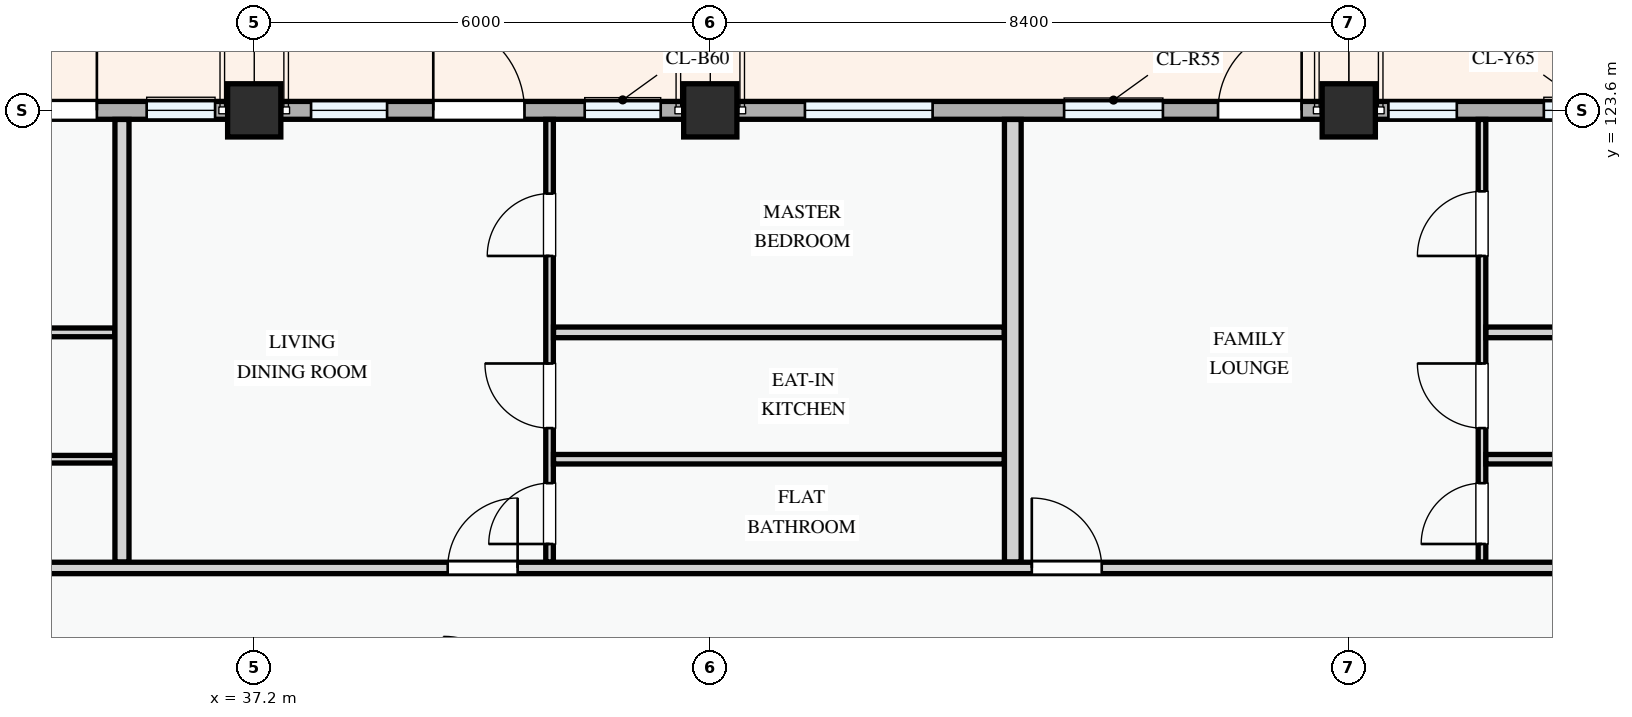
"""IFC4 building model, lengths in metres.
Left out: names, types, materials, properties, quantities, classifications, styles, units other than length and angle.
Written with IfcOpenShell. Run it as: python <this file> out.ifc"""

import sys

from ifc_helpers import new_model, si_unit, direction, frame, frame_2d, origin, origin_2d, place, context, subcontext, project, spatial, rectangle, extrude, element, fill, save


model = new_model("IFC4")
c1 = context("Model", 3, precision=1e-05, world=origin(), true_north=direction((0.0, 1.0)))
c2 = subcontext(c1, "Body", "Model", "MODEL_VIEW")
j1 = project(units=[si_unit("LENGTHUNIT", "METRE"), si_unit("PLANEANGLEUNIT", "RADIAN")], contexts=[c1])
p1 = place(None, origin())
s1 = spatial("IfcSite", under=j1, at=p1, CompositionType="ELEMENT")
p2 = place(p1, origin())
s2 = spatial("IfcBuilding", under=s1, at=p2, CompositionType="ELEMENT")
p3 = place(p2, frame((0.0, 0.0, 11.4)))
s3 = spatial("IfcBuildingStorey", under=s2, at=p3, CompositionType="ELEMENT", Elevation=11.4)
for number, where, z_axis, x_axis in (
    (1, (37.2, 123.6, 0.0), (0.0, 0.0, 1.0), (1.0, 0.0, 0.0)),
    (2, (43.2, 123.6, 0.0), (0.0, 0.0, 1.0), (1.0, 0.0, 0.0)),
    (3, (51.6, 123.6, 0.0), (0.0, 0.0, 1.0), (1.0, 0.0, 0.0)),
):
    element("IfcColumn", number, at=place(p3, frame(where, z_axis=z_axis, x_axis=x_axis)), inside=s3, PredefinedType="COLUMN", context=c2, shape_type="SweptSolid", body=[
        extrude(rectangle(XDim=0.7, YDim=0.7, at=origin_2d()), origin(), (0.0, 0.0, 1.0), 3.3),
    ])
p4 = place(p3, frame((57.6, 123.6, 0.0), z_axis=(0.0, 0.0, 1.0), x_axis=(-1.0, 0.0, 0.0)))
e4 = element("IfcWall", 4, at=p4, inside=s3, PredefinedType="STANDARD", context=c2, shape_type="SweptSolid", body=[
    extrude(rectangle(XDim=6.0, YDim=0.235, at=frame_2d((3.0, 0.0))), origin(), (0.0, 0.0, 1.0), 2.475),
])
p5 = place(p4, frame((0.62, 0.0, 0.0)))
e5 = element("IfcOpeningElement", 5, at=p5, cuts=e4, PredefinedType="OPENING", context=c2, shape_type="SweptSolid", body=[
    extrude(rectangle(XDim=1.05, YDim=2.15, at=frame_2d((0.525, 1.075))), frame((0.0, 0.127, 0.0), z_axis=(0.0, -1.0, 0.0), x_axis=(1.0, 0.0, 0.0)), (0.0, 0.0, 1.0), 0.255),
])
p6 = place(p4, frame((2.534, 0.0, 0.78)))
e6 = element("IfcOpeningElement", 6, at=p6, cuts=e4, PredefinedType="OPENING", context=c2, shape_type="SweptSolid", body=[
    extrude(rectangle(XDim=0.9, YDim=1.2, at=frame_2d((0.45, 0.6))), frame((0.0, 0.127, 0.0), z_axis=(0.0, -1.0, 0.0), x_axis=(1.0, 0.0, 0.0)), (0.0, 0.0, 1.0), 0.255),
])
p7 = place(p4, frame((4.579, 0.0, 0.78)))
e7 = element("IfcOpeningElement", 7, at=p7, cuts=e4, PredefinedType="OPENING", context=c2, shape_type="SweptSolid", body=[
    extrude(rectangle(XDim=0.9, YDim=1.2, at=frame_2d((0.45, 0.6))), frame((0.0, 0.127, 0.0), z_axis=(0.0, -1.0, 0.0), x_axis=(1.0, 0.0, 0.0)), (0.0, 0.0, 1.0), 0.255),
])
p8 = place(p3, frame((51.6, 123.6, 0.0), z_axis=(0.0, 0.0, 1.0), x_axis=(-1.0, 0.0, 0.0)))
e8 = element("IfcWall", 8, at=p8, inside=s3, PredefinedType="STANDARD", context=c2, shape_type="SweptSolid", body=[
    extrude(rectangle(XDim=8.4, YDim=0.235, at=frame_2d((4.2, 0.0))), origin(), (0.0, 0.0, 1.0), 2.375),
])
p9 = place(p8, frame((0.62, 0.0, 0.0)))
e9 = element("IfcOpeningElement", 9, at=p9, cuts=e8, PredefinedType="OPENING", context=c2, shape_type="SweptSolid", body=[
    extrude(rectangle(XDim=1.1, YDim=2.15, at=frame_2d((0.55, 1.075))), frame((0.0, 0.127, 0.0), z_axis=(0.0, -1.0, 0.0), x_axis=(1.0, 0.0, 0.0)), (0.0, 0.0, 1.0), 0.255),
])
p10 = place(p8, frame((2.445, 0.0, 0.78)))
e10 = element("IfcOpeningElement", 10, at=p10, cuts=e8, PredefinedType="OPENING", context=c2, shape_type="SweptSolid", body=[
    extrude(rectangle(XDim=1.3, YDim=1.4, at=frame_2d((0.65, 0.7))), frame((0.0, 0.127, 0.0), z_axis=(0.0, -1.0, 0.0), x_axis=(1.0, 0.0, 0.0)), (0.0, 0.0, 1.0), 0.255),
])
p11 = place(p8, frame((5.475, 0.0, 0.78)))
e11 = element("IfcOpeningElement", 11, at=p11, cuts=e8, PredefinedType="OPENING", context=c2, shape_type="SweptSolid", body=[
    extrude(rectangle(XDim=1.68, YDim=1.46, at=frame_2d((0.84, 0.73))), frame((0.0, 0.127, 0.0), z_axis=(0.0, -1.0, 0.0), x_axis=(1.0, 0.0, 0.0)), (0.0, 0.0, 1.0), 0.255),
])
p12 = place(p3, frame((43.2, 123.6, 0.0), z_axis=(0.0, 0.0, 1.0), x_axis=(-1.0, 0.0, 0.0)))
e12 = element("IfcWall", 12, at=p12, inside=s3, PredefinedType="STANDARD", context=c2, shape_type="SweptSolid", body=[
    extrude(rectangle(XDim=6.0, YDim=0.235, at=frame_2d((3.0, 0.0))), origin(), (0.0, 0.0, 1.0), 2.475),
])
p13 = place(p12, frame((2.444, 0.0, 0.0)))
e13 = element("IfcOpeningElement", 13, at=p13, cuts=e12, PredefinedType="OPENING", context=c2, shape_type="SweptSolid", body=[
    extrude(rectangle(XDim=1.2, YDim=2.15, at=frame_2d((0.6, 1.075))), frame((0.0, 0.127, 0.0), z_axis=(0.0, -1.0, 0.0), x_axis=(1.0, 0.0, 0.0)), (0.0, 0.0, 1.0), 0.255),
])
p14 = place(p12, frame((0.652, 0.0, 0.78)))
e14 = element("IfcOpeningElement", 14, at=p14, cuts=e12, PredefinedType="OPENING", context=c2, shape_type="SweptSolid", body=[
    extrude(rectangle(XDim=1.0, YDim=1.25, at=frame_2d((0.5, 0.625))), frame((0.0, 0.127, 0.0), z_axis=(0.0, -1.0, 0.0), x_axis=(1.0, 0.0, 0.0)), (0.0, 0.0, 1.0), 0.255),
])
p15 = place(p12, frame((4.252, 0.0, 0.78)))
e15 = element("IfcOpeningElement", 15, at=p15, cuts=e12, PredefinedType="OPENING", context=c2, shape_type="SweptSolid", body=[
    extrude(rectangle(XDim=1.0, YDim=1.25, at=frame_2d((0.5, 0.625))), frame((0.0, 0.127, 0.0), z_axis=(0.0, -1.0, 0.0), x_axis=(1.0, 0.0, 0.0)), (0.0, 0.0, 1.0), 0.255),
])
p16 = place(p3, frame((37.2, 123.6, 0.0), z_axis=(0.0, 0.0, 1.0), x_axis=(-1.0, 0.0, 0.0)))
e16 = element("IfcWall", 16, at=p16, inside=s3, PredefinedType="STANDARD", context=c2, shape_type="SweptSolid", body=[
    extrude(rectangle(XDim=8.4, YDim=0.235, at=frame_2d((4.2, 0.0))), origin(), (0.0, 0.0, 1.0), 2.375),
])
p17 = place(p16, frame((2.07, 0.0, 0.0)))
e17 = element("IfcOpeningElement", 17, at=p17, cuts=e16, PredefinedType="OPENING", context=c2, shape_type="SweptSolid", body=[
    extrude(rectangle(XDim=1.25, YDim=2.2, at=frame_2d((0.625, 1.1))), frame((0.0, 0.127, 0.0), z_axis=(0.0, -1.0, 0.0), x_axis=(1.0, 0.0, 0.0)), (0.0, 0.0, 1.0), 0.255),
])
p18 = place(p16, frame((0.515, 0.0, 0.78)))
e18 = element("IfcOpeningElement", 18, at=p18, cuts=e16, PredefinedType="OPENING", context=c2, shape_type="SweptSolid", body=[
    extrude(rectangle(XDim=0.9, YDim=1.2, at=frame_2d((0.45, 0.6))), frame((0.0, 0.127, 0.0), z_axis=(0.0, -1.0, 0.0), x_axis=(1.0, 0.0, 0.0)), (0.0, 0.0, 1.0), 0.255),
])
p19 = place(p16, frame((4.361, 0.0, 0.78)))
e19 = element("IfcOpeningElement", 19, at=p19, cuts=e16, PredefinedType="OPENING", context=c2, shape_type="SweptSolid", body=[
    extrude(rectangle(XDim=1.25, YDim=1.45, at=frame_2d((0.625, 0.725))), frame((0.0, 0.127, 0.0), z_axis=(0.0, -1.0, 0.0), x_axis=(1.0, 0.0, 0.0)), (0.0, 0.0, 1.0), 0.255),
])
p20 = place(p16, frame((6.931, 0.0, 0.78)))
e20 = element("IfcOpeningElement", 20, at=p20, cuts=e16, PredefinedType="OPENING", context=c2, shape_type="SweptSolid", body=[
    extrude(rectangle(XDim=0.95, YDim=1.15, at=frame_2d((0.475, 0.575))), frame((0.0, 0.127, 0.0), z_axis=(0.0, -1.0, 0.0), x_axis=(1.0, 0.0, 0.0)), (0.0, 0.0, 1.0), 0.255),
])
p21 = place(p3, frame((30.663, 120.679, 0.0), z_axis=(0.0, 0.0, 1.0), x_axis=(1.0, 0.0, 0.0)))
e21 = element("IfcWall", 21, at=p21, inside=s3, PredefinedType="PARTITIONING", context=c2, shape_type="SweptSolid", body=[
    extrude(rectangle(XDim=4.702, YDim=0.115, at=frame_2d((2.351, 0.0))), origin(), (0.0, 0.0, 1.0), 3.0),
])
p22 = place(p3, frame((30.663, 119.01, 0.0), z_axis=(0.0, 0.0, 1.0), x_axis=(1.0, 0.0, 0.0)))
e22 = element("IfcWall", 22, at=p22, inside=s3, PredefinedType="PARTITIONING", context=c2, shape_type="SweptSolid", body=[
    extrude(rectangle(XDim=4.702, YDim=0.1, at=frame_2d((2.351, 0.0))), origin(), (0.0, 0.0, 1.0), 3.0),
])
p23 = place(p3, frame((41.086, 117.657, 0.0), z_axis=(0.0, 0.0, 1.0), x_axis=(0.0, 1.0, 0.0)))
e23 = element("IfcWall", 23, at=p23, inside=s3, PredefinedType="PARTITIONING", context=c2, shape_type="SweptSolid", body=[
    extrude(rectangle(XDim=5.823, YDim=0.1, at=frame_2d((2.912, 0.0))), origin(), (0.0, 0.0, 1.0), 3.0),
])
p24 = place(p23, frame((0.238, 0.0, 0.0)))
e24 = element("IfcOpeningElement", 24, at=p24, cuts=e23, PredefinedType="OPENING", context=c2, shape_type="SweptSolid", body=[
    extrude(rectangle(XDim=0.8, YDim=2.1, at=frame_2d((0.4, 1.05))), frame((0.0, 0.06, 0.0), z_axis=(0.0, -1.0, 0.0), x_axis=(1.0, 0.0, 0.0)), (0.0, 0.0, 1.0), 0.12),
])
p25 = place(p23, frame((1.763, 0.0, 0.0)))
e25 = element("IfcOpeningElement", 25, at=p25, cuts=e23, PredefinedType="OPENING", context=c2, shape_type="SweptSolid", body=[
    extrude(rectangle(XDim=0.85, YDim=2.1, at=frame_2d((0.425, 1.05))), frame((0.0, 0.06, 0.0), z_axis=(0.0, -1.0, 0.0), x_axis=(1.0, 0.0, 0.0)), (0.0, 0.0, 1.0), 0.12),
])
p26 = place(p23, frame((4.028, 0.0, 0.0)))
e26 = element("IfcOpeningElement", 26, at=p26, cuts=e23, PredefinedType="OPENING", context=c2, shape_type="SweptSolid", body=[
    extrude(rectangle(XDim=0.82, YDim=2.08, at=frame_2d((0.41, 1.04))), frame((0.0, 0.06, 0.0), z_axis=(0.0, -1.0, 0.0), x_axis=(1.0, 0.0, 0.0)), (0.0, 0.0, 1.0), 0.12),
])
p27 = place(p3, frame((41.138, 120.679, 0.0), z_axis=(0.0, 0.0, 1.0), x_axis=(1.0, 0.0, 0.0)))
e27 = element("IfcWall", 27, at=p27, inside=s3, PredefinedType="PARTITIONING", context=c2, shape_type="SweptSolid", body=[
    extrude(rectangle(XDim=5.93, YDim=0.14, at=frame_2d((2.965, 0.0))), origin(), (0.0, 0.0, 1.0), 3.0),
])
p28 = place(p3, frame((41.138, 119.01, 0.0), z_axis=(0.0, 0.0, 1.0), x_axis=(1.0, 0.0, 0.0)))
e28 = element("IfcWall", 28, at=p28, inside=s3, PredefinedType="PARTITIONING", context=c2, shape_type="SweptSolid", body=[
    extrude(rectangle(XDim=5.93, YDim=0.125, at=frame_2d((2.965, 0.0))), origin(), (0.0, 0.0, 1.0), 3.0),
])
p29 = place(p3, frame((35.46, 117.657, 0.0), z_axis=(0.0, 0.0, 1.0), x_axis=(0.0, 1.0, 0.0)))
e29 = element("IfcWall", 29, at=p29, inside=s3, PredefinedType="PARTITIONING", context=c2, shape_type="SweptSolid", body=[
    extrude(rectangle(XDim=5.823, YDim=0.185, at=frame_2d((2.912, 0.0))), origin(), (0.0, 0.0, 1.0), 3.0),
])
p30 = place(p3, frame((53.353, 117.657, 0.0), z_axis=(0.0, 0.0, 1.0), x_axis=(0.0, 1.0, 0.0)))
e30 = element("IfcWall", 30, at=p30, inside=s3, PredefinedType="PARTITIONING", context=c2, shape_type="SweptSolid", body=[
    extrude(rectangle(XDim=5.823, YDim=0.1, at=frame_2d((2.912, 0.0))), origin(), (0.0, 0.0, 1.0), 3.0),
])
p31 = place(p30, frame((0.238, 0.0, 0.0)))
e31 = element("IfcOpeningElement", 31, at=p31, cuts=e30, PredefinedType="OPENING", context=c2, shape_type="SweptSolid", body=[
    extrude(rectangle(XDim=0.8, YDim=2.1, at=frame_2d((0.4, 1.05))), frame((0.0, 0.06, 0.0), z_axis=(0.0, -1.0, 0.0), x_axis=(1.0, 0.0, 0.0)), (0.0, 0.0, 1.0), 0.12),
])
p32 = place(p30, frame((1.763, 0.0, 0.0)))
e32 = element("IfcOpeningElement", 32, at=p32, cuts=e30, PredefinedType="OPENING", context=c2, shape_type="SweptSolid", body=[
    extrude(rectangle(XDim=0.85, YDim=2.1, at=frame_2d((0.425, 1.05))), frame((0.0, 0.06, 0.0), z_axis=(0.0, -1.0, 0.0), x_axis=(1.0, 0.0, 0.0)), (0.0, 0.0, 1.0), 0.12),
])
p33 = place(p30, frame((4.028, 0.0, 0.0)))
e33 = element("IfcOpeningElement", 33, at=p33, cuts=e30, PredefinedType="OPENING", context=c2, shape_type="SweptSolid", body=[
    extrude(rectangle(XDim=0.85, YDim=2.1, at=frame_2d((0.425, 1.05))), frame((0.0, 0.06, 0.0), z_axis=(0.0, -1.0, 0.0), x_axis=(1.0, 0.0, 0.0)), (0.0, 0.0, 1.0), 0.12),
])
p34 = place(p3, frame((53.405, 120.679, 0.0), z_axis=(0.0, 0.0, 1.0), x_axis=(1.0, 0.0, 0.0)))
e34 = element("IfcWall", 34, at=p34, inside=s3, PredefinedType="PARTITIONING", context=c2, shape_type="SweptSolid", body=[
    extrude(rectangle(XDim=4.135, YDim=0.14, at=frame_2d((2.068, 0.0))), origin(), (0.0, 0.0, 1.0), 3.0),
])
p35 = place(p3, frame((53.405, 119.01, 0.0), z_axis=(0.0, 0.0, 1.0), x_axis=(1.0, 0.0, 0.0)))
e35 = element("IfcWall", 35, at=p35, inside=s3, PredefinedType="PARTITIONING", context=c2, shape_type="SweptSolid", body=[
    extrude(rectangle(XDim=4.135, YDim=0.125, at=frame_2d((2.068, 0.0))), origin(), (0.0, 0.0, 1.0), 3.0),
])
p36 = place(p3, frame((47.18, 117.657, 0.0), z_axis=(0.0, 0.0, 1.0), x_axis=(0.0, 1.0, 0.0)))
e36 = element("IfcWall", 36, at=p36, inside=s3, PredefinedType="PARTITIONING", context=c2, shape_type="SweptSolid", body=[
    extrude(rectangle(XDim=5.823, YDim=0.22, at=frame_2d((2.912, 0.0))), origin(), (0.0, 0.0, 1.0), 2.585),
])
p37 = place(p3, frame((22.66, 117.58, 0.0), z_axis=(0.0, 0.0, 1.0), x_axis=(1.0, 0.0, 0.0)))
e37 = element("IfcWall", 37, at=p37, inside=s3, PredefinedType="PARTITIONING", context=c2, shape_type="SweptSolid", body=[
    extrude(rectangle(XDim=34.88, YDim=0.15, at=frame_2d((17.44, 0.0))), origin(), (0.0, 0.0, 1.0), 3.0),
])
p38 = place(p37, frame((2.74, 0.0, 0.0)))
e38 = element("IfcOpeningElement", 38, at=p38, cuts=e37, PredefinedType="OPENING", context=c2, shape_type="SweptSolid", body=[
    extrude(rectangle(XDim=0.92, YDim=2.1, at=frame_2d((0.46, 1.05))), frame((0.0, 0.085, 0.0), z_axis=(0.0, -1.0, 0.0), x_axis=(1.0, 0.0, 0.0)), (0.0, 0.0, 1.0), 0.17),
])
p39 = place(p37, frame((17.085, 0.0, 0.0)))
e39 = element("IfcOpeningElement", 39, at=p39, cuts=e37, PredefinedType="OPENING", context=c2, shape_type="SweptSolid", body=[
    extrude(rectangle(XDim=0.92, YDim=2.1, at=frame_2d((0.46, 1.05))), frame((0.0, 0.085, 0.0), z_axis=(0.0, -1.0, 0.0), x_axis=(1.0, 0.0, 0.0)), (0.0, 0.0, 1.0), 0.17),
])
p40 = place(p37, frame((24.77, 0.0, 0.0)))
e40 = element("IfcOpeningElement", 40, at=p40, cuts=e37, PredefinedType="OPENING", context=c2, shape_type="SweptSolid", body=[
    extrude(rectangle(XDim=0.92, YDim=2.1, at=frame_2d((0.46, 1.05))), frame((0.0, 0.085, 0.0), z_axis=(0.0, -1.0, 0.0), x_axis=(1.0, 0.0, 0.0)), (0.0, 0.0, 1.0), 0.17),
])
p41 = place(p6, origin())
e41 = element("IfcWindow", 41, at=p41, inside=s3, PartitioningType="SINGLE_PANEL", PredefinedType="WINDOW", context=c2, shape_type="SweptSolid", body=[
    extrude(rectangle(XDim=0.9, YDim=1.2, at=frame_2d((0.45, 0.6))), frame((0.0, 0.03, 0.0), z_axis=(0.0, -1.0, 0.0), x_axis=(1.0, 0.0, 0.0)), (0.0, 0.0, 1.0), 0.06),
])
fill(e6, e41)
p42 = place(p7, origin())
e42 = element("IfcWindow", 42, at=p42, inside=s3, PartitioningType="SINGLE_PANEL", PredefinedType="WINDOW", context=c2, shape_type="SweptSolid", body=[
    extrude(rectangle(XDim=0.9, YDim=1.2, at=frame_2d((0.45, 0.6))), frame((0.0, 0.03, 0.0), z_axis=(0.0, -1.0, 0.0), x_axis=(1.0, 0.0, 0.0)), (0.0, 0.0, 1.0), 0.06),
])
fill(e7, e42)
p43 = place(p9, frame((1.1, 0.0, 0.0), z_axis=(0.0, 0.0, 1.0), x_axis=(-1.0, 0.0, 0.0)))
e43 = element("IfcDoor", 43, at=p43, inside=s3, OperationType="SINGLE_SWING_RIGHT", PredefinedType="DOOR", context=c2, shape_type="SweptSolid", body=[
    extrude(rectangle(XDim=1.1, YDim=2.15, at=frame_2d((0.55, 1.075))), frame((0.0, 0.025, 0.0), z_axis=(0.0, -1.0, 0.0), x_axis=(1.0, 0.0, 0.0)), (0.0, 0.0, 1.0), 0.05),
])
fill(e9, e43)
p44 = place(p10, origin())
e44 = element("IfcWindow", 44, at=p44, inside=s3, PartitioningType="SINGLE_PANEL", PredefinedType="WINDOW", context=c2, shape_type="SweptSolid", body=[
    extrude(rectangle(XDim=1.3, YDim=1.4, at=frame_2d((0.65, 0.7))), frame((0.0, 0.03, 0.0), z_axis=(0.0, -1.0, 0.0), x_axis=(1.0, 0.0, 0.0)), (0.0, 0.0, 1.0), 0.06),
])
fill(e10, e44)
p45 = place(p11, origin())
e45 = element("IfcWindow", 45, at=p45, inside=s3, PartitioningType="DOUBLE_PANEL_VERTICAL", PredefinedType="WINDOW", context=c2, shape_type="SweptSolid", body=[
    extrude(rectangle(XDim=1.68, YDim=1.46, at=frame_2d((0.84, 0.73))), frame((0.0, 0.03, 0.0), z_axis=(0.0, -1.0, 0.0), x_axis=(1.0, 0.0, 0.0)), (0.0, 0.0, 1.0), 0.06),
])
fill(e11, e45)
p46 = place(p13, frame((1.2, 0.0, 0.0), z_axis=(0.0, 0.0, 1.0), x_axis=(-1.0, 0.0, 0.0)))
e46 = element("IfcDoor", 46, at=p46, inside=s3, OperationType="SINGLE_SWING_LEFT", PredefinedType="DOOR", context=c2, shape_type="SweptSolid", body=[
    extrude(rectangle(XDim=1.2, YDim=2.15, at=frame_2d((0.6, 1.075))), frame((0.0, 0.025, 0.0), z_axis=(0.0, -1.0, 0.0), x_axis=(1.0, 0.0, 0.0)), (0.0, 0.0, 1.0), 0.05),
])
fill(e13, e46)
p47 = place(p14, origin())
e47 = element("IfcWindow", 47, at=p47, inside=s3, PartitioningType="SINGLE_PANEL", PredefinedType="WINDOW", context=c2, shape_type="SweptSolid", body=[
    extrude(rectangle(XDim=1.0, YDim=1.25, at=frame_2d((0.5, 0.625))), frame((0.0, 0.03, 0.0), z_axis=(0.0, -1.0, 0.0), x_axis=(1.0, 0.0, 0.0)), (0.0, 0.0, 1.0), 0.06),
])
fill(e14, e47)
p48 = place(p15, origin())
e48 = element("IfcWindow", 48, at=p48, inside=s3, PartitioningType="SINGLE_PANEL", PredefinedType="WINDOW", context=c2, shape_type="SweptSolid", body=[
    extrude(rectangle(XDim=1.0, YDim=1.25, at=frame_2d((0.5, 0.625))), frame((0.0, 0.03, 0.0), z_axis=(0.0, -1.0, 0.0), x_axis=(1.0, 0.0, 0.0)), (0.0, 0.0, 1.0), 0.06),
])
fill(e15, e48)
p49 = place(p17, frame((1.25, 0.0, 0.0), z_axis=(0.0, 0.0, 1.0), x_axis=(-1.0, 0.0, 0.0)))
e49 = element("IfcDoor", 49, at=p49, inside=s3, OperationType="SINGLE_SWING_RIGHT", PredefinedType="DOOR", context=c2, shape_type="SweptSolid", body=[
    extrude(rectangle(XDim=1.25, YDim=2.2, at=frame_2d((0.625, 1.1))), frame((0.0, 0.025, 0.0), z_axis=(0.0, -1.0, 0.0), x_axis=(1.0, 0.0, 0.0)), (0.0, 0.0, 1.0), 0.05),
])
fill(e17, e49)
p50 = place(p18, origin())
e50 = element("IfcWindow", 50, at=p50, inside=s3, PartitioningType="SINGLE_PANEL", PredefinedType="WINDOW", context=c2, shape_type="SweptSolid", body=[
    extrude(rectangle(XDim=0.9, YDim=1.2, at=frame_2d((0.45, 0.6))), frame((0.0, 0.03, 0.0), z_axis=(0.0, -1.0, 0.0), x_axis=(1.0, 0.0, 0.0)), (0.0, 0.0, 1.0), 0.06),
])
fill(e18, e50)
p51 = place(p24, origin())
e51 = element("IfcDoor", 51, at=p51, inside=s3, OperationType="SINGLE_SWING_LEFT", PredefinedType="DOOR", context=c2, shape_type="SweptSolid", body=[
    extrude(rectangle(XDim=0.8, YDim=2.1, at=frame_2d((0.4, 1.05))), frame((0.0, 0.025, 0.0), z_axis=(0.0, -1.0, 0.0), x_axis=(1.0, 0.0, 0.0)), (0.0, 0.0, 1.0), 0.05),
])
fill(e24, e51)
p52 = place(p25, origin())
e52 = element("IfcDoor", 52, at=p52, inside=s3, OperationType="SINGLE_SWING_RIGHT", PredefinedType="DOOR", context=c2, shape_type="SweptSolid", body=[
    extrude(rectangle(XDim=0.85, YDim=2.1, at=frame_2d((0.425, 1.05))), frame((0.0, 0.025, 0.0), z_axis=(0.0, -1.0, 0.0), x_axis=(1.0, 0.0, 0.0)), (0.0, 0.0, 1.0), 0.05),
])
fill(e25, e52)
p53 = place(p26, origin())
e53 = element("IfcDoor", 53, at=p53, inside=s3, OperationType="SINGLE_SWING_LEFT", PredefinedType="DOOR", context=c2, shape_type="SweptSolid", body=[
    extrude(rectangle(XDim=0.82, YDim=2.08, at=frame_2d((0.41, 1.04))), frame((0.0, 0.025, 0.0), z_axis=(0.0, -1.0, 0.0), x_axis=(1.0, 0.0, 0.0)), (0.0, 0.0, 1.0), 0.05),
])
fill(e26, e53)
p54 = place(p31, origin())
e54 = element("IfcDoor", 54, at=p54, inside=s3, OperationType="SINGLE_SWING_LEFT", PredefinedType="DOOR", context=c2, shape_type="SweptSolid", body=[
    extrude(rectangle(XDim=0.8, YDim=2.1, at=frame_2d((0.4, 1.05))), frame((0.0, 0.025, 0.0), z_axis=(0.0, -1.0, 0.0), x_axis=(1.0, 0.0, 0.0)), (0.0, 0.0, 1.0), 0.05),
])
fill(e31, e54)
p55 = place(p32, origin())
e55 = element("IfcDoor", 55, at=p55, inside=s3, OperationType="SINGLE_SWING_RIGHT", PredefinedType="DOOR", context=c2, shape_type="SweptSolid", body=[
    extrude(rectangle(XDim=0.85, YDim=2.1, at=frame_2d((0.425, 1.05))), frame((0.0, 0.025, 0.0), z_axis=(0.0, -1.0, 0.0), x_axis=(1.0, 0.0, 0.0)), (0.0, 0.0, 1.0), 0.05),
])
fill(e32, e55)
p56 = place(p33, origin())
e56 = element("IfcDoor", 56, at=p56, inside=s3, OperationType="SINGLE_SWING_LEFT", PredefinedType="DOOR", context=c2, shape_type="SweptSolid", body=[
    extrude(rectangle(XDim=0.85, YDim=2.1, at=frame_2d((0.425, 1.05))), frame((0.0, 0.025, 0.0), z_axis=(0.0, -1.0, 0.0), x_axis=(1.0, 0.0, 0.0)), (0.0, 0.0, 1.0), 0.05),
])
fill(e33, e56)
p57 = place(p39, origin())
e57 = element("IfcDoor", 57, at=p57, inside=s3, OperationType="SINGLE_SWING_RIGHT", PredefinedType="DOOR", context=c2, shape_type="SweptSolid", body=[
    extrude(rectangle(XDim=0.92, YDim=2.1, at=frame_2d((0.46, 1.05))), frame((0.0, 0.025, 0.0), z_axis=(0.0, -1.0, 0.0), x_axis=(1.0, 0.0, 0.0)), (0.0, 0.0, 1.0), 0.05),
])
fill(e39, e57)
p58 = place(p40, origin())
e58 = element("IfcDoor", 58, at=p58, inside=s3, OperationType="SINGLE_SWING_LEFT", PredefinedType="DOOR", context=c2, shape_type="SweptSolid", body=[
    extrude(rectangle(XDim=0.92, YDim=2.1, at=frame_2d((0.46, 1.05))), frame((0.0, 0.025, 0.0), z_axis=(0.0, -1.0, 0.0), x_axis=(1.0, 0.0, 0.0)), (0.0, 0.0, 1.0), 0.05),
])
fill(e40, e58)
save(model, sys.argv[1])
